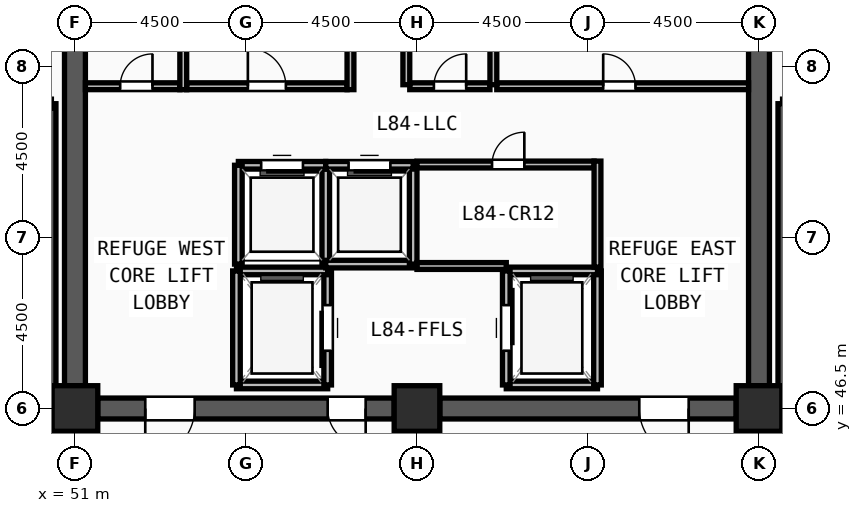
"""IFC4 building model, lengths in metres.
Left out: names, types, materials, properties, quantities, classifications, styles, units other than length and angle.
Written with IfcOpenShell. Run it as: python <this file> out.ifc"""

import sys

from ifc_helpers import new_model, si_unit, direction, frame, frame_2d, origin, origin_2d, place, context, subcontext, project, spatial, rectangle, extrude, source, transform, mapped, element, fill, save


model = new_model("IFC4")
c1 = context("Model", 3, precision=1e-05, world=origin(), true_north=direction((0.0, 1.0)))
c2 = subcontext(c1, "Body", "Model", "MODEL_VIEW")
j1 = project(units=[si_unit("LENGTHUNIT", "METRE"), si_unit("PLANEANGLEUNIT", "RADIAN")], contexts=[c1])
p1 = place(None, origin())
s1 = spatial("IfcSite", under=j1, at=p1, CompositionType="ELEMENT")
p2 = place(p1, origin())
s2 = spatial("IfcBuilding", under=s1, at=p2, CompositionType="ELEMENT")
p3 = place(p2, frame((0.0, 0.0, 324.0)))
s3 = spatial("IfcBuildingStorey", under=s2, at=p3, CompositionType="ELEMENT", Elevation=324.0)
m1 = source(origin(), c2, "Body", "SweptSolid", [
    extrude(rectangle(XDim=1.2, YDim=1.2, at=origin_2d()), origin(), (0.0, 0.0, 1.0), 4.5),
])
for number, where, z_axis, x_axis in (
    (1, (51.0, 46.5, 0.0), (0.0, 0.0, 1.0), (1.0, 0.0, 0.0)),
    (2, (60.0, 46.5, 0.0), (0.0, 0.0, 1.0), (1.0, 0.0, 0.0)),
    (3, (69.0, 46.5, 0.0), (0.0, 0.0, 1.0), (1.0, 0.0, 0.0)),
):
    element("IfcColumn", number, at=place(p3, frame(where, z_axis=z_axis, x_axis=x_axis)), inside=s3, PredefinedType="COLUMN", context=c2, shape_type="MappedRepresentation", body=[
        mapped(m1, transform((0.0, 0.0, 0.0), x_axis=(1.0, 0.0, 0.0), y_axis=(0.0, 1.0, 0.0), z_axis=(0.0, 0.0, 1.0), scale=1.0)),
    ])
p4 = place(p3, frame((69.0, 60.9, 0.0), z_axis=(0.0, 0.0, 1.0), x_axis=(0.0, -1.0, 0.0)))
e4 = element("IfcWall", 4, at=p4, inside=s3, PredefinedType="SHEAR", context=c2, shape_type="SweptSolid", body=[
    extrude(rectangle(XDim=13.8, YDim=0.55, at=frame_2d((6.9, 0.0))), origin(), (0.0, 0.0, 1.0), 4.32),
])
m2 = source(origin(), c2, "Body", "SweptSolid", [
    extrude(rectangle(XDim=1.2, YDim=2.2, at=frame_2d((0.6, 1.1))), frame((0.0, 0.285, 0.0), z_axis=(0.0, -1.0, 0.0), x_axis=(1.0, 0.0, 0.0)), (0.0, 0.0, 1.0), 0.57),
])
p5 = place(p4, frame((1.35, 0.0, 0.0)))
e5 = element("IfcOpeningElement", 5, at=p5, cuts=e4, PredefinedType="OPENING", context=c2, shape_type="MappedRepresentation", body=[
    mapped(m2, transform((0.0, 0.0, 0.0), x_axis=(1.0, 0.0, 0.0), y_axis=(0.0, 1.0, 0.0), z_axis=(0.0, 0.0, 1.0), scale=1.0)),
])
p6 = place(p3, frame((68.4, 46.5, 0.0), z_axis=(0.0, 0.0, 1.0), x_axis=(-1.0, 0.0, 0.0)))
e6 = element("IfcWall", 6, at=p6, inside=s3, PredefinedType="SHEAR", context=c2, shape_type="SweptSolid", body=[
    extrude(rectangle(XDim=7.8, YDim=0.55, at=frame_2d((3.9, 0.0))), origin(), (0.0, 0.0, 1.0), 4.32),
])
m3 = source(origin(), c2, "Body", "SweptSolid", [
    extrude(rectangle(XDim=1.3, YDim=2.2, at=frame_2d((0.65, 1.1))), frame((0.0, 0.285, 0.0), z_axis=(0.0, -1.0, 0.0), x_axis=(1.0, 0.0, 0.0)), (0.0, 0.0, 1.0), 0.57),
])
p7 = place(p6, frame((1.25, 0.0, 0.0)))
e7 = element("IfcOpeningElement", 7, at=p7, cuts=e6, PredefinedType="OPENING", context=c2, shape_type="MappedRepresentation", body=[
    mapped(m3, transform((0.0, 0.0, 0.0), x_axis=(1.0, 0.0, 0.0), y_axis=(0.0, 1.0, 0.0), z_axis=(0.0, 0.0, 1.0), scale=1.0)),
])
p8 = place(p3, frame((59.4, 46.5, 0.0), z_axis=(0.0, 0.0, 1.0), x_axis=(-1.0, 0.0, 0.0)))
e8 = element("IfcWall", 8, at=p8, inside=s3, PredefinedType="SHEAR", context=c2, shape_type="SweptSolid", body=[
    extrude(rectangle(XDim=7.8, YDim=0.55, at=frame_2d((3.9, 0.0))), origin(), (0.0, 0.0, 1.0), 4.32),
])
p9 = place(p8, frame((5.25, 0.0, 0.0)))
e9 = element("IfcOpeningElement", 9, at=p9, cuts=e8, PredefinedType="OPENING", context=c2, shape_type="MappedRepresentation", body=[
    mapped(m3, transform((0.0, 0.0, 0.0), x_axis=(1.0, 0.0, 0.0), y_axis=(0.0, 1.0, 0.0), z_axis=(0.0, 0.0, 1.0), scale=1.0)),
])
m4 = source(origin(), c2, "Body", "SweptSolid", [
    extrude(rectangle(XDim=1.0, YDim=2.2, at=frame_2d((0.5, 1.1))), frame((0.0, 0.285, 0.0), z_axis=(0.0, -1.0, 0.0), x_axis=(1.0, 0.0, 0.0)), (0.0, 0.0, 1.0), 0.57),
])
p10 = place(p8, frame((0.75, 0.0, 0.0)))
e10 = element("IfcOpeningElement", 10, at=p10, cuts=e8, PredefinedType="OPENING", context=c2, shape_type="MappedRepresentation", body=[
    mapped(m4, transform((0.0, 0.0, 0.0), x_axis=(1.0, 0.0, 0.0), y_axis=(0.0, 1.0, 0.0), z_axis=(0.0, 0.0, 1.0), scale=1.0)),
])
p11 = place(p3, frame((51.0, 47.1, 0.0), z_axis=(0.0, 0.0, 1.0), x_axis=(0.0, 1.0, 0.0)))
e11 = element("IfcWall", 11, at=p11, inside=s3, PredefinedType="SHEAR", context=c2, shape_type="SweptSolid", body=[
    extrude(rectangle(XDim=13.8, YDim=0.55, at=frame_2d((6.9, 0.0))), origin(), (0.0, 0.0, 1.0), 4.32),
])
for number, where, z_axis, x_axis in (
    (12, (50.38, 46.7, 0.0), (0.0, 0.0, 1.0), (0.0, 1.0, 0.0)),
    (13, (69.62, 54.52, 0.0), (0.0, 0.0, 1.0), (0.0, -1.0, 0.0)),
):
    element("IfcWall", number, at=place(p3, frame(where, z_axis=z_axis, x_axis=x_axis)), inside=s3, PredefinedType="SOLIDWALL", context=c2, shape_type="SweptSolid", body=[
        extrude(rectangle(XDim=7.82, YDim=0.24, at=frame_2d((3.91, 0.0))), origin(), (0.0, 0.0, 1.0), 4.32),
    ])
p12 = place(p3, frame((55.25, 47.12, 0.0), z_axis=(0.0, 0.0, 1.0), x_axis=(1.0, 0.0, 0.0)))
e14 = element("IfcWall", 14, at=p12, inside=s3, PredefinedType="SOLIDWALL", context=c2, shape_type="SweptSolid", body=[
    extrude(rectangle(XDim=2.4, YDim=0.2, at=frame_2d((1.2, 0.0))), origin(), (0.0, 0.0, 1.0), 4.32),
])
p13 = place(p3, frame((57.65, 47.12, 0.0), z_axis=(0.0, 0.0, 1.0), x_axis=(0.0, 1.0, 0.0)))
e15 = element("IfcWall", 15, at=p13, inside=s3, PredefinedType="SOLIDWALL", context=c2, shape_type="SweptSolid", body=[
    extrude(rectangle(XDim=3.0, YDim=0.2, at=frame_2d((1.5, 0.0))), origin(), (0.0, 0.0, 1.0), 4.32),
])
m5 = source(origin(), c2, "Body", "SweptSolid", [
    extrude(rectangle(XDim=1.2, YDim=2.3, at=frame_2d((0.6, 1.15))), frame((0.0, 0.11, 0.0), z_axis=(0.0, -1.0, 0.0), x_axis=(1.0, 0.0, 0.0)), (0.0, 0.0, 1.0), 0.22),
])
p14 = place(p13, frame((0.9, 0.0, 0.0)))
e16 = element("IfcOpeningElement", 16, at=p14, cuts=e15, PredefinedType="OPENING", context=c2, shape_type="MappedRepresentation", body=[
    mapped(m5, transform((0.0, 0.0, 0.0), x_axis=(1.0, 0.0, 0.0), y_axis=(0.0, 1.0, 0.0), z_axis=(0.0, 0.0, 1.0), scale=1.0)),
])
p15 = place(p3, frame((57.65, 50.12, 0.0), z_axis=(0.0, 0.0, 1.0), x_axis=(-1.0, 0.0, 0.0)))
e17 = element("IfcWall", 17, at=p15, inside=s3, PredefinedType="SOLIDWALL", context=c2, shape_type="SweptSolid", body=[
    extrude(rectangle(XDim=2.4, YDim=0.2, at=frame_2d((1.2, 0.0))), origin(), (0.0, 0.0, 1.0), 4.32),
])
p16 = place(p3, frame((55.25, 50.12, 0.0), z_axis=(0.0, 0.0, 1.0), x_axis=(0.0, -1.0, 0.0)))
e18 = element("IfcWall", 18, at=p16, inside=s3, PredefinedType="SOLIDWALL", context=c2, shape_type="SweptSolid", body=[
    extrude(rectangle(XDim=3.0, YDim=0.2, at=frame_2d((1.5, 0.0))), origin(), (0.0, 0.0, 1.0), 4.32),
])
p17 = place(p3, frame((62.35, 47.12, 0.0), z_axis=(0.0, 0.0, 1.0), x_axis=(1.0, 0.0, 0.0)))
e19 = element("IfcWall", 19, at=p17, inside=s3, PredefinedType="SOLIDWALL", context=c2, shape_type="SweptSolid", body=[
    extrude(rectangle(XDim=2.4, YDim=0.2, at=frame_2d((1.2, 0.0))), origin(), (0.0, 0.0, 1.0), 4.32),
])
p18 = place(p3, frame((64.75, 47.12, 0.0), z_axis=(0.0, 0.0, 1.0), x_axis=(0.0, 1.0, 0.0)))
e20 = element("IfcWall", 20, at=p18, inside=s3, PredefinedType="SOLIDWALL", context=c2, shape_type="SweptSolid", body=[
    extrude(rectangle(XDim=3.0, YDim=0.2, at=frame_2d((1.5, 0.0))), origin(), (0.0, 0.0, 1.0), 4.32),
])
p19 = place(p3, frame((64.75, 50.12, 0.0), z_axis=(0.0, 0.0, 1.0), x_axis=(-1.0, 0.0, 0.0)))
e21 = element("IfcWall", 21, at=p19, inside=s3, PredefinedType="SOLIDWALL", context=c2, shape_type="SweptSolid", body=[
    extrude(rectangle(XDim=2.4, YDim=0.2, at=frame_2d((1.2, 0.0))), origin(), (0.0, 0.0, 1.0), 4.32),
])
p20 = place(p3, frame((62.35, 50.12, 0.0), z_axis=(0.0, 0.0, 1.0), x_axis=(0.0, -1.0, 0.0)))
e22 = element("IfcWall", 22, at=p20, inside=s3, PredefinedType="SOLIDWALL", context=c2, shape_type="SweptSolid", body=[
    extrude(rectangle(XDim=3.0, YDim=0.2, at=frame_2d((1.5, 0.0))), origin(), (0.0, 0.0, 1.0), 4.32),
])
p21 = place(p20, frame((0.9, 0.0, 0.0)))
e23 = element("IfcOpeningElement", 23, at=p21, cuts=e22, PredefinedType="OPENING", context=c2, shape_type="MappedRepresentation", body=[
    mapped(m5, transform((0.0, 0.0, 0.0), x_axis=(1.0, 0.0, 0.0), y_axis=(0.0, 1.0, 0.0), z_axis=(0.0, 0.0, 1.0), scale=1.0)),
])
p22 = place(p3, frame((57.6, 50.3, 0.0), z_axis=(0.0, 0.0, 1.0), x_axis=(0.0, 1.0, 0.0)))
e24 = element("IfcWall", 24, at=p22, inside=s3, PredefinedType="SOLIDWALL", context=c2, shape_type="SweptSolid", body=[
    extrude(rectangle(XDim=2.6, YDim=0.2, at=frame_2d((1.3, 0.0))), origin(), (0.0, 0.0, 1.0), 4.32),
])
p23 = place(p3, frame((57.6, 52.9, 0.0), z_axis=(0.0, 0.0, 1.0), x_axis=(-1.0, 0.0, 0.0)))
e25 = element("IfcWall", 25, at=p23, inside=s3, PredefinedType="SOLIDWALL", context=c2, shape_type="SweptSolid", body=[
    extrude(rectangle(XDim=2.3, YDim=0.2, at=frame_2d((1.15, 0.0))), origin(), (0.0, 0.0, 1.0), 4.32),
])
m6 = source(origin(), c2, "Body", "SweptSolid", [
    extrude(rectangle(XDim=1.1, YDim=2.2, at=frame_2d((0.55, 1.1))), frame((0.0, 0.11, 0.0), z_axis=(0.0, -1.0, 0.0), x_axis=(1.0, 0.0, 0.0)), (0.0, 0.0, 1.0), 0.22),
])
p24 = place(p23, frame((0.6, 0.0, 0.0)))
e26 = element("IfcOpeningElement", 26, at=p24, cuts=e25, PredefinedType="OPENING", context=c2, shape_type="MappedRepresentation", body=[
    mapped(m6, transform((0.0, 0.0, 0.0), x_axis=(1.0, 0.0, 0.0), y_axis=(0.0, 1.0, 0.0), z_axis=(0.0, 0.0, 1.0), scale=1.0)),
])
p25 = place(p3, frame((55.3, 52.9, 0.0), z_axis=(0.0, 0.0, 1.0), x_axis=(0.0, -1.0, 0.0)))
e27 = element("IfcWall", 27, at=p25, inside=s3, PredefinedType="SOLIDWALL", context=c2, shape_type="SweptSolid", body=[
    extrude(rectangle(XDim=2.6, YDim=0.2, at=frame_2d((1.3, 0.0))), origin(), (0.0, 0.0, 1.0), 4.32),
])
p26 = place(p3, frame((57.6, 50.3, 0.0), z_axis=(0.0, 0.0, 1.0), x_axis=(1.0, 0.0, 0.0)))
e28 = element("IfcWall", 28, at=p26, inside=s3, PredefinedType="SOLIDWALL", context=c2, shape_type="SweptSolid", body=[
    extrude(rectangle(XDim=2.3, YDim=0.2, at=frame_2d((1.15, 0.0))), origin(), (0.0, 0.0, 1.0), 4.32),
])
p27 = place(p3, frame((59.9, 50.3, 0.0), z_axis=(0.0, 0.0, 1.0), x_axis=(0.0, 1.0, 0.0)))
e29 = element("IfcWall", 29, at=p27, inside=s3, PredefinedType="SOLIDWALL", context=c2, shape_type="SweptSolid", body=[
    extrude(rectangle(XDim=2.6, YDim=0.2, at=frame_2d((1.3, 0.0))), origin(), (0.0, 0.0, 1.0), 4.32),
])
p28 = place(p3, frame((59.9, 52.9, 0.0), z_axis=(0.0, 0.0, 1.0), x_axis=(-1.0, 0.0, 0.0)))
e30 = element("IfcWall", 30, at=p28, inside=s3, PredefinedType="SOLIDWALL", context=c2, shape_type="SweptSolid", body=[
    extrude(rectangle(XDim=2.3, YDim=0.2, at=frame_2d((1.15, 0.0))), origin(), (0.0, 0.0, 1.0), 4.32),
])
p29 = place(p28, frame((0.6, 0.0, 0.0)))
e31 = element("IfcOpeningElement", 31, at=p29, cuts=e30, PredefinedType="OPENING", context=c2, shape_type="MappedRepresentation", body=[
    mapped(m6, transform((0.0, 0.0, 0.0), x_axis=(1.0, 0.0, 0.0), y_axis=(0.0, 1.0, 0.0), z_axis=(0.0, 0.0, 1.0), scale=1.0)),
])
p30 = place(p3, frame((60.0, 52.92, 0.0), z_axis=(0.0, 0.0, 1.0), x_axis=(1.0, 0.0, 0.0)))
e32 = element("IfcWall", 32, at=p30, inside=s3, PredefinedType="PARTITIONING", context=c2, shape_type="SweptSolid", body=[
    extrude(rectangle(XDim=4.66, YDim=0.18, at=frame_2d((2.33, 0.0))), origin(), (0.0, 0.0, 1.0), 4.32),
])
m7 = source(origin(), c2, "Body", "SweptSolid", [
    extrude(rectangle(XDim=0.85, YDim=2.1, at=frame_2d((0.425, 1.05))), frame((0.0, 0.1, 0.0), z_axis=(0.0, -1.0, 0.0), x_axis=(1.0, 0.0, 0.0)), (0.0, 0.0, 1.0), 0.2),
])
p31 = place(p30, frame((1.975, 0.0, 0.0)))
e33 = element("IfcOpeningElement", 33, at=p31, cuts=e32, PredefinedType="OPENING", context=c2, shape_type="MappedRepresentation", body=[
    mapped(m7, transform((0.0, 0.0, 0.0), x_axis=(1.0, 0.0, 0.0), y_axis=(0.0, 1.0, 0.0), z_axis=(0.0, 0.0, 1.0), scale=1.0)),
])
p32 = place(p3, frame((53.94, 54.98, 0.0), z_axis=(0.0, 0.0, 1.0), x_axis=(1.0, 0.0, 0.0)))
e34 = element("IfcWall", 34, at=p32, inside=s3, PredefinedType="PARTITIONING", context=c2, shape_type="SweptSolid", body=[
    extrude(rectangle(XDim=4.22, YDim=0.18, at=frame_2d((2.11, 0.0))), origin(), (0.0, 0.0, 1.0), 4.32),
])
m8 = source(origin(), c2, "Body", "SweptSolid", [
    extrude(rectangle(XDim=1.0, YDim=2.2, at=frame_2d((0.5, 1.1))), frame((0.0, 0.1, 0.0), z_axis=(0.0, -1.0, 0.0), x_axis=(1.0, 0.0, 0.0)), (0.0, 0.0, 1.0), 0.2),
])
p33 = place(p32, frame((1.61, 0.0, 0.0)))
e35 = element("IfcOpeningElement", 35, at=p33, cuts=e34, PredefinedType="OPENING", context=c2, shape_type="MappedRepresentation", body=[
    mapped(m8, transform((0.0, 0.0, 0.0), x_axis=(1.0, 0.0, 0.0), y_axis=(0.0, 1.0, 0.0), z_axis=(0.0, 0.0, 1.0), scale=1.0)),
])
p34 = place(p3, frame((51.275, 54.98, 0.0), z_axis=(0.0, 0.0, 1.0), x_axis=(1.0, 0.0, 0.0)))
e36 = element("IfcWall", 36, at=p34, inside=s3, PredefinedType="PARTITIONING", context=c2, shape_type="SweptSolid", body=[
    extrude(rectangle(XDim=2.485, YDim=0.18, at=frame_2d((1.243, 0.0))), origin(), (0.0, 0.0, 1.0), 4.32),
])
p35 = place(p34, frame((0.915, 0.0, 0.0)))
e37 = element("IfcOpeningElement", 37, at=p35, cuts=e36, PredefinedType="OPENING", context=c2, shape_type="MappedRepresentation", body=[
    mapped(m7, transform((0.0, 0.0, 0.0), x_axis=(1.0, 0.0, 0.0), y_axis=(0.0, 1.0, 0.0), z_axis=(0.0, 0.0, 1.0), scale=1.0)),
])
p36 = place(p3, frame((62.1, 54.98, 0.0), z_axis=(0.0, 0.0, 1.0), x_axis=(1.0, 0.0, 0.0)))
e38 = element("IfcWall", 38, at=p36, inside=s3, PredefinedType="PARTITIONING", context=c2, shape_type="SweptSolid", body=[
    extrude(rectangle(XDim=6.625, YDim=0.18, at=frame_2d((3.312, 0.0))), origin(), (0.0, 0.0, 1.0), 4.32),
])
p37 = place(p36, frame((2.8, 0.0, 0.0)))
e39 = element("IfcOpeningElement", 39, at=p37, cuts=e38, PredefinedType="OPENING", context=c2, shape_type="MappedRepresentation", body=[
    mapped(m7, transform((0.0, 0.0, 0.0), x_axis=(1.0, 0.0, 0.0), y_axis=(0.0, 1.0, 0.0), z_axis=(0.0, 0.0, 1.0), scale=1.0)),
])
p38 = place(p3, frame((59.81, 54.98, 0.0), z_axis=(0.0, 0.0, 1.0), x_axis=(1.0, 0.0, 0.0)))
e40 = element("IfcWall", 40, at=p38, inside=s3, PredefinedType="PARTITIONING", context=c2, shape_type="SweptSolid", body=[
    extrude(rectangle(XDim=2.11, YDim=0.18, at=frame_2d((1.055, 0.0))), origin(), (0.0, 0.0, 1.0), 4.32),
])
p39 = place(p38, frame((0.635, 0.0, 0.0)))
e41 = element("IfcOpeningElement", 41, at=p39, cuts=e40, PredefinedType="OPENING", context=c2, shape_type="MappedRepresentation", body=[
    mapped(m7, transform((0.0, 0.0, 0.0), x_axis=(1.0, 0.0, 0.0), y_axis=(0.0, 1.0, 0.0), z_axis=(0.0, 0.0, 1.0), scale=1.0)),
])
for number, where, z_axis, x_axis in (
    (42, (59.72, 55.02, 0.0), (0.0, 0.0, 1.0), (0.0, 1.0, 0.0)),
    (43, (62.01, 55.02, 0.0), (0.0, 0.0, 1.0), (0.0, 1.0, 0.0)),
):
    element("IfcWall", number, at=place(p3, frame(where, z_axis=z_axis, x_axis=x_axis)), inside=s3, PredefinedType="PARTITIONING", context=c2, shape_type="SweptSolid", body=[
        extrude(rectangle(XDim=2.88, YDim=0.18, at=frame_2d((1.44, 0.0))), origin(), (0.0, 0.0, 1.0), 4.32),
    ])
p40 = place(p3, frame((64.75, 50.22, 0.0), z_axis=(0.0, 0.0, 1.0), x_axis=(0.0, 1.0, 0.0)))
e44 = element("IfcWall", 44, at=p40, inside=s3, PredefinedType="PARTITIONING", context=c2, shape_type="SweptSolid", body=[
    extrude(rectangle(XDim=2.79, YDim=0.18, at=frame_2d((1.395, 0.0))), origin(), (0.0, 0.0, 1.0), 4.32),
])
p41 = place(p3, frame((60.0, 50.25, 0.0), z_axis=(0.0, 0.0, 1.0), x_axis=(1.0, 0.0, 0.0)))
e45 = element("IfcWall", 45, at=p41, inside=s3, PredefinedType="PARTITIONING", context=c2, shape_type="SweptSolid", body=[
    extrude(rectangle(XDim=2.35, YDim=0.18, at=frame_2d((1.175, 0.0))), origin(), (0.0, 0.0, 1.0), 4.32),
])
for number, where, z_axis, x_axis in (
    (46, (53.85, 54.89, 0.0), (0.0, 0.0, 1.0), (0.0, 1.0, 0.0)),
    (47, (58.25, 54.89, 0.0), (0.0, 0.0, 1.0), (0.0, 1.0, 0.0)),
):
    element("IfcWall", number, at=place(p3, frame(where, z_axis=z_axis, x_axis=x_axis)), inside=s3, PredefinedType="PARTITIONING", context=c2, shape_type="SweptSolid", body=[
        extrude(rectangle(XDim=3.02, YDim=0.18, at=frame_2d((1.51, 0.0))), origin(), (0.0, 0.0, 1.0), 4.32),
    ])
m9 = source(origin(), c2, "Body", "SweptSolid", [
    extrude(rectangle(XDim=1.3, YDim=2.2, at=frame_2d((0.65, 1.1))), frame((0.0, 0.025, 0.0), z_axis=(0.0, -1.0, 0.0), x_axis=(1.0, 0.0, 0.0)), (0.0, 0.0, 1.0), 0.05),
])
p42 = place(p9, origin())
e48 = element("IfcDoor", 48, at=p42, inside=s3, OperationType="SINGLE_SWING_RIGHT", PredefinedType="DOOR", context=c2, shape_type="MappedRepresentation", body=[
    mapped(m9, transform((0.0, 0.0, 0.0), x_axis=(1.0, 0.0, 0.0), y_axis=(0.0, 1.0, 0.0), z_axis=(0.0, 0.0, 1.0), scale=1.0)),
])
fill(e9, e48)
m10 = source(origin(), c2, "Body", "SweptSolid", [
    extrude(rectangle(XDim=1.0, YDim=2.2, at=frame_2d((0.5, 1.1))), frame((0.0, 0.025, 0.0), z_axis=(0.0, -1.0, 0.0), x_axis=(1.0, 0.0, 0.0)), (0.0, 0.0, 1.0), 0.05),
])
p43 = place(p10, origin())
e49 = element("IfcDoor", 49, at=p43, inside=s3, OperationType="SINGLE_SWING_LEFT", PredefinedType="DOOR", context=c2, shape_type="MappedRepresentation", body=[
    mapped(m10, transform((0.0, 0.0, 0.0), x_axis=(1.0, 0.0, 0.0), y_axis=(0.0, 1.0, 0.0), z_axis=(0.0, 0.0, 1.0), scale=1.0)),
])
fill(e10, e49)
p44 = place(p7, origin())
e50 = element("IfcDoor", 50, at=p44, inside=s3, OperationType="SINGLE_SWING_LEFT", PredefinedType="DOOR", context=c2, shape_type="MappedRepresentation", body=[
    mapped(m9, transform((0.0, 0.0, 0.0), x_axis=(1.0, 0.0, 0.0), y_axis=(0.0, 1.0, 0.0), z_axis=(0.0, 0.0, 1.0), scale=1.0)),
])
fill(e7, e50)
m11 = source(origin(), c2, "Body", "SweptSolid", [
    extrude(rectangle(XDim=1.2, YDim=2.3, at=frame_2d((0.6, 1.15))), frame((0.0, 0.025, 0.0), z_axis=(0.0, -1.0, 0.0), x_axis=(1.0, 0.0, 0.0)), (0.0, 0.0, 1.0), 0.05),
])
p45 = place(p14, origin())
e51 = element("IfcDoor", 51, at=p45, inside=s3, OperationType="SLIDING_TO_LEFT", PredefinedType="DOOR", context=c2, shape_type="MappedRepresentation", body=[
    mapped(m11, transform((0.0, 0.0, 0.0), x_axis=(1.0, 0.0, 0.0), y_axis=(0.0, 1.0, 0.0), z_axis=(0.0, 0.0, 1.0), scale=1.0)),
])
fill(e16, e51)
p46 = place(p21, origin())
e52 = element("IfcDoor", 52, at=p46, inside=s3, OperationType="SLIDING_TO_LEFT", PredefinedType="DOOR", context=c2, shape_type="MappedRepresentation", body=[
    mapped(m11, transform((0.0, 0.0, 0.0), x_axis=(1.0, 0.0, 0.0), y_axis=(0.0, 1.0, 0.0), z_axis=(0.0, 0.0, 1.0), scale=1.0)),
])
fill(e23, e52)
m12 = source(origin(), c2, "Body", "SweptSolid", [
    extrude(rectangle(XDim=1.1, YDim=2.2, at=frame_2d((0.55, 1.1))), frame((0.0, 0.025, 0.0), z_axis=(0.0, -1.0, 0.0), x_axis=(1.0, 0.0, 0.0)), (0.0, 0.0, 1.0), 0.05),
])
p47 = place(p24, origin())
e53 = element("IfcDoor", 53, at=p47, inside=s3, OperationType="SLIDING_TO_LEFT", PredefinedType="DOOR", context=c2, shape_type="MappedRepresentation", body=[
    mapped(m12, transform((0.0, 0.0, 0.0), x_axis=(1.0, 0.0, 0.0), y_axis=(0.0, 1.0, 0.0), z_axis=(0.0, 0.0, 1.0), scale=1.0)),
])
fill(e26, e53)
p48 = place(p29, origin())
e54 = element("IfcDoor", 54, at=p48, inside=s3, OperationType="SLIDING_TO_LEFT", PredefinedType="DOOR", context=c2, shape_type="MappedRepresentation", body=[
    mapped(m12, transform((0.0, 0.0, 0.0), x_axis=(1.0, 0.0, 0.0), y_axis=(0.0, 1.0, 0.0), z_axis=(0.0, 0.0, 1.0), scale=1.0)),
])
fill(e31, e54)
m13 = source(origin(), c2, "Body", "SweptSolid", [
    extrude(rectangle(XDim=0.85, YDim=2.1, at=frame_2d((0.425, 1.05))), frame((0.0, 0.025, 0.0), z_axis=(0.0, -1.0, 0.0), x_axis=(1.0, 0.0, 0.0)), (0.0, 0.0, 1.0), 0.05),
])
p49 = place(p31, origin())
e55 = element("IfcDoor", 55, at=p49, inside=s3, OperationType="SINGLE_SWING_RIGHT", PredefinedType="DOOR", context=c2, shape_type="MappedRepresentation", body=[
    mapped(m13, transform((0.0, 0.0, 0.0), x_axis=(1.0, 0.0, 0.0), y_axis=(0.0, 1.0, 0.0), z_axis=(0.0, 0.0, 1.0), scale=1.0)),
])
fill(e33, e55)
p50 = place(p33, origin())
e56 = element("IfcDoor", 56, at=p50, inside=s3, OperationType="SINGLE_SWING_LEFT", PredefinedType="DOOR", context=c2, shape_type="MappedRepresentation", body=[
    mapped(m10, transform((0.0, 0.0, 0.0), x_axis=(1.0, 0.0, 0.0), y_axis=(0.0, 1.0, 0.0), z_axis=(0.0, 0.0, 1.0), scale=1.0)),
])
fill(e35, e56)
p51 = place(p35, origin())
e57 = element("IfcDoor", 57, at=p51, inside=s3, OperationType="SINGLE_SWING_RIGHT", PredefinedType="DOOR", context=c2, shape_type="MappedRepresentation", body=[
    mapped(m13, transform((0.0, 0.0, 0.0), x_axis=(1.0, 0.0, 0.0), y_axis=(0.0, 1.0, 0.0), z_axis=(0.0, 0.0, 1.0), scale=1.0)),
])
fill(e37, e57)
p52 = place(p37, origin())
e58 = element("IfcDoor", 58, at=p52, inside=s3, OperationType="SINGLE_SWING_LEFT", PredefinedType="DOOR", context=c2, shape_type="MappedRepresentation", body=[
    mapped(m13, transform((0.0, 0.0, 0.0), x_axis=(1.0, 0.0, 0.0), y_axis=(0.0, 1.0, 0.0), z_axis=(0.0, 0.0, 1.0), scale=1.0)),
])
fill(e39, e58)
p53 = place(p39, origin())
e59 = element("IfcDoor", 59, at=p53, inside=s3, OperationType="SINGLE_SWING_RIGHT", PredefinedType="DOOR", context=c2, shape_type="MappedRepresentation", body=[
    mapped(m13, transform((0.0, 0.0, 0.0), x_axis=(1.0, 0.0, 0.0), y_axis=(0.0, 1.0, 0.0), z_axis=(0.0, 0.0, 1.0), scale=1.0)),
])
fill(e41, e59)
save(model, sys.argv[1])
